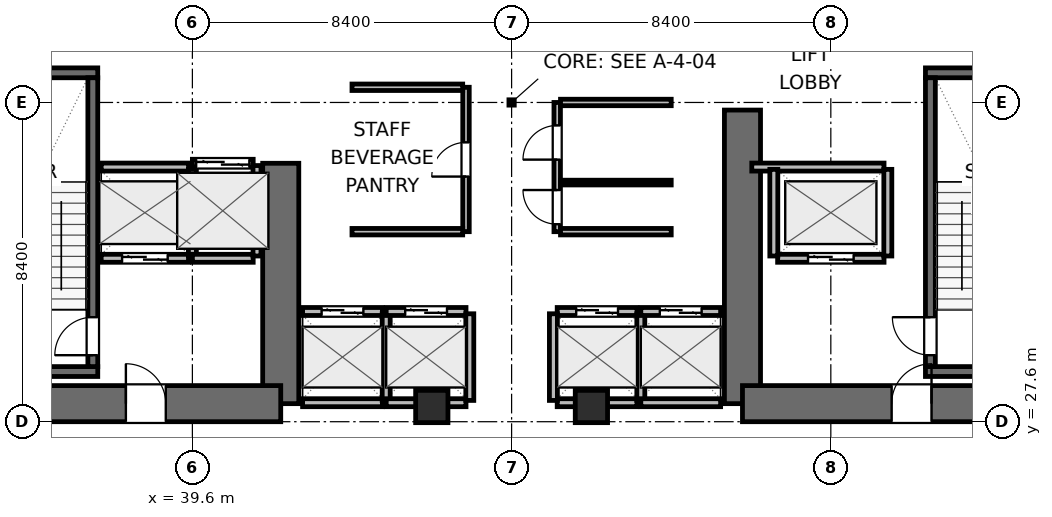
"""IFC4 building model, lengths in metres.
Left out: names, types, materials, properties, quantities, classifications, styles, units other than length and angle.
Written with IfcOpenShell. Run it as: python <this file> out.ifc"""

import sys

from ifc_helpers import new_model, si_unit, direction, frame, frame_2d, origin, origin_2d, place, context, subcontext, project, spatial, rectangle, extrude, element, fill, save


model = new_model("IFC4")
c1 = context("Model", 3, precision=1e-05, world=origin(), true_north=direction((0.0, 1.0)))
c2 = subcontext(c1, "Body", "Model", "MODEL_VIEW")
j1 = project(units=[si_unit("LENGTHUNIT", "METRE"), si_unit("PLANEANGLEUNIT", "RADIAN")], contexts=[c1])
p1 = place(None, origin())
s1 = spatial("IfcSite", under=j1, at=p1, CompositionType="ELEMENT")
p2 = place(p1, origin())
s2 = spatial("IfcBuilding", under=s1, at=p2, CompositionType="ELEMENT")
p3 = place(p2, frame((0.0, 0.0, 68.4)))
s3 = spatial("IfcBuildingStorey", under=s2, at=p3, CompositionType="ELEMENT", Elevation=68.4)
p4 = place(p3, frame((41.925, 28.075, 0.0), z_axis=(0.0, 0.0, 1.0), x_axis=(0.0, 1.0, 0.0)))
e1 = element("IfcWall", 1, at=p4, inside=s3, PredefinedType="SHEAR", context=c2, shape_type="SweptSolid", body=[
    extrude(rectangle(XDim=6.325, YDim=0.95, at=frame_2d((3.163, 0.0))), origin(), (0.0, 0.0, 1.0), 4.5),
])
p5 = place(p3, frame((32.875, 28.075, 0.0), z_axis=(0.0, 0.0, 1.0), x_axis=(1.0, 0.0, 0.0)))
e2 = element("IfcWall", 2, at=p5, inside=s3, PredefinedType="SHEAR", context=c2, shape_type="SweptSolid", body=[
    extrude(rectangle(XDim=9.05, YDim=0.95, at=frame_2d((4.525, 0.0))), origin(), (0.0, 0.0, 1.0), 4.5),
])
p6 = place(p5, frame((4.975, 0.0, 0.0)))
e3 = element("IfcOpeningElement", 3, at=p6, cuts=e2, PredefinedType="OPENING", context=c2, shape_type="SweptSolid", body=[
    extrude(rectangle(XDim=1.05, YDim=2.04, at=frame_2d((0.525, 1.02))), frame((0.0, 0.485, 0.0), z_axis=(0.0, -1.0, 0.0), x_axis=(1.0, 0.0, 0.0)), (0.0, 0.0, 1.0), 0.97),
])
p7 = place(p3, frame((54.075, 28.075, 0.0), z_axis=(0.0, 0.0, 1.0), x_axis=(0.0, 1.0, 0.0)))
e4 = element("IfcWall", 4, at=p7, inside=s3, PredefinedType="SHEAR", context=c2, shape_type="SweptSolid", body=[
    extrude(rectangle(XDim=7.725, YDim=0.95, at=frame_2d((3.863, 0.0))), origin(), (0.0, 0.0, 1.0), 4.5),
])
p8 = place(p3, frame((54.075, 28.075, 0.0), z_axis=(0.0, 0.0, 1.0), x_axis=(1.0, 0.0, 0.0)))
e5 = element("IfcWall", 5, at=p8, inside=s3, PredefinedType="SHEAR", context=c2, shape_type="SweptSolid", body=[
    extrude(rectangle(XDim=9.05, YDim=0.95, at=frame_2d((4.525, 0.0))), origin(), (0.0, 0.0, 1.0), 4.5),
])
p9 = place(p8, frame((3.925, 0.0, 0.0)))
e6 = element("IfcOpeningElement", 6, at=p9, cuts=e5, PredefinedType="OPENING", context=c2, shape_type="SweptSolid", body=[
    extrude(rectangle(XDim=1.05, YDim=2.04, at=frame_2d((0.525, 1.02))), frame((0.0, 0.485, 0.0), z_axis=(0.0, -1.0, 0.0), x_axis=(1.0, 0.0, 0.0)), (0.0, 0.0, 1.0), 0.97),
])
for number, where, z_axis, x_axis in (
    (7, (33.35, 28.92, 0.0), (0.0, 0.0, 1.0), (1.0, 0.0, 0.0)),
    (8, (33.35, 36.78, 0.0), (0.0, 0.0, 1.0), (1.0, 0.0, 0.0)),
):
    element("IfcWall", number, at=place(p3, frame(where, z_axis=z_axis, x_axis=x_axis)), inside=s3, PredefinedType="SHEAR", context=c2, shape_type="SweptSolid", body=[
        extrude(rectangle(XDim=3.76, YDim=0.26, at=frame_2d((1.88, 0.0))), origin(), (0.0, 0.0, 1.0), 4.5),
    ])
p10 = place(p3, frame((36.98, 29.05, 0.0), z_axis=(0.0, 0.0, 1.0), x_axis=(0.0, 1.0, 0.0)))
e9 = element("IfcWall", 9, at=p10, inside=s3, PredefinedType="SHEAR", context=c2, shape_type="SweptSolid", body=[
    extrude(rectangle(XDim=7.6, YDim=0.26, at=frame_2d((3.8, 0.0))), origin(), (0.0, 0.0, 1.0), 4.5),
])
p11 = place(p10, frame((0.3, 0.0, 0.0)))
e10 = element("IfcOpeningElement", 10, at=p11, cuts=e9, PredefinedType="OPENING", context=c2, shape_type="SweptSolid", body=[
    extrude(rectangle(XDim=1.0, YDim=2.04, at=frame_2d((0.5, 1.02))), frame((0.0, 0.14, 0.0), z_axis=(0.0, -1.0, 0.0), x_axis=(1.0, 0.0, 0.0)), (0.0, 0.0, 1.0), 0.28),
])
for number, where, z_axis, x_axis in (
    (11, (58.89, 28.92, 0.0), (0.0, 0.0, 1.0), (1.0, 0.0, 0.0)),
    (12, (58.89, 36.78, 0.0), (0.0, 0.0, 1.0), (1.0, 0.0, 0.0)),
):
    element("IfcWall", number, at=place(p3, frame(where, z_axis=z_axis, x_axis=x_axis)), inside=s3, PredefinedType="SHEAR", context=c2, shape_type="SweptSolid", body=[
        extrude(rectangle(XDim=3.76, YDim=0.26, at=frame_2d((1.88, 0.0))), origin(), (0.0, 0.0, 1.0), 4.5),
    ])
p12 = place(p3, frame((59.02, 29.05, 0.0), z_axis=(0.0, 0.0, 1.0), x_axis=(0.0, 1.0, 0.0)))
e13 = element("IfcWall", 13, at=p12, inside=s3, PredefinedType="SHEAR", context=c2, shape_type="SweptSolid", body=[
    extrude(rectangle(XDim=7.6, YDim=0.26, at=frame_2d((3.8, 0.0))), origin(), (0.0, 0.0, 1.0), 4.5),
])
p13 = place(p12, frame((0.3, 0.0, 0.0)))
e14 = element("IfcOpeningElement", 14, at=p13, cuts=e13, PredefinedType="OPENING", context=c2, shape_type="SweptSolid", body=[
    extrude(rectangle(XDim=1.0, YDim=2.04, at=frame_2d((0.5, 1.02))), frame((0.0, 0.14, 0.0), z_axis=(0.0, -1.0, 0.0), x_axis=(1.0, 0.0, 0.0)), (0.0, 0.0, 1.0), 0.28),
])
for number, where, z_axis, x_axis in (
    (15, (45.9, 28.0, 0.0), (0.0, 0.0, 1.0), (1.0, 0.0, 0.0)),
    (16, (50.1, 28.0, 0.0), (0.0, 0.0, 1.0), (1.0, 0.0, 0.0)),
):
    element("IfcColumn", number, at=place(p3, frame(where, z_axis=z_axis, x_axis=x_axis)), inside=s3, PredefinedType="COLUMN", context=c2, shape_type="SweptSolid", body=[
        extrude(rectangle(XDim=0.85, YDim=0.85, at=origin_2d()), origin(), (0.0, 0.0, 1.0), 4.5),
    ])
p14 = place(p3, frame((37.2, 31.9, 0.0), z_axis=(0.0, 0.0, 1.0), x_axis=(1.0, 0.0, 0.0)))
e17 = element("IfcWall", 17, at=p14, inside=s3, PredefinedType="PARTITIONING", context=c2, shape_type="SweptSolid", body=[
    extrude(rectangle(XDim=2.3, YDim=0.21, at=frame_2d((1.15, 0.0))), origin(), (0.0, 0.0, 1.0), 4.24),
])
p15 = place(p14, frame((0.55, 0.0, 0.0)))
e18 = element("IfcOpeningElement", 18, at=p15, cuts=e17, PredefinedType="OPENING", context=c2, shape_type="SweptSolid", body=[
    extrude(rectangle(XDim=1.2, YDim=2.04, at=frame_2d((0.6, 1.02))), frame((0.0, 0.115, 0.0), z_axis=(0.0, -1.0, 0.0), x_axis=(1.0, 0.0, 0.0)), (0.0, 0.0, 1.0), 0.23),
])
p16 = place(p3, frame((37.2, 34.3, 0.0), z_axis=(0.0, 0.0, 1.0), x_axis=(1.0, 0.0, 0.0)))
e19 = element("IfcWall", 19, at=p16, inside=s3, PredefinedType="PARTITIONING", context=c2, shape_type="SweptSolid", body=[
    extrude(rectangle(XDim=2.3, YDim=0.21, at=frame_2d((1.15, 0.0))), origin(), (0.0, 0.0, 1.0), 4.24),
])
p17 = place(p3, frame((39.6, 31.96, 0.0), z_axis=(0.0, 0.0, 1.0), x_axis=(0.0, 1.0, 0.0)))
e20 = element("IfcWall", 20, at=p17, inside=s3, PredefinedType="PARTITIONING", context=c2, shape_type="SweptSolid", body=[
    extrude(rectangle(XDim=2.28, YDim=0.21, at=frame_2d((1.14, 0.0))), origin(), (0.0, 0.0, 1.0), 4.24),
])
p18 = place(p3, frame((55.0, 31.9, 0.0), z_axis=(0.0, 0.0, 1.0), x_axis=(1.0, 0.0, 0.0)))
e21 = element("IfcWall", 21, at=p18, inside=s3, PredefinedType="PARTITIONING", context=c2, shape_type="SweptSolid", body=[
    extrude(rectangle(XDim=2.8, YDim=0.21, at=frame_2d((1.4, 0.0))), origin(), (0.0, 0.0, 1.0), 4.24),
])
p19 = place(p18, frame((0.8, 0.0, 0.0)))
e22 = element("IfcOpeningElement", 22, at=p19, cuts=e21, PredefinedType="OPENING", context=c2, shape_type="SweptSolid", body=[
    extrude(rectangle(XDim=1.2, YDim=2.04, at=frame_2d((0.6, 1.02))), frame((0.0, 0.115, 0.0), z_axis=(0.0, -1.0, 0.0), x_axis=(1.0, 0.0, 0.0)), (0.0, 0.0, 1.0), 0.23),
])
p20 = place(p3, frame((54.32, 34.3, 0.0), z_axis=(0.0, 0.0, 1.0), x_axis=(1.0, 0.0, 0.0)))
e23 = element("IfcWall", 23, at=p20, inside=s3, PredefinedType="PARTITIONING", context=c2, shape_type="SweptSolid", body=[
    extrude(rectangle(XDim=3.48, YDim=0.21, at=frame_2d((1.74, 0.0))), origin(), (0.0, 0.0, 1.0), 4.24),
])
for number, where, z_axis, x_axis in (
    (24, (54.9, 31.96, 0.0), (0.0, 0.0, 1.0), (0.0, 1.0, 0.0)),
    (25, (57.9, 31.96, 0.0), (0.0, 0.0, 1.0), (0.0, 1.0, 0.0)),
):
    element("IfcWall", number, at=place(p3, frame(where, z_axis=z_axis, x_axis=x_axis)), inside=s3, PredefinedType="PARTITIONING", context=c2, shape_type="SweptSolid", body=[
        extrude(rectangle(XDim=2.28, YDim=0.21, at=frame_2d((1.14, 0.0))), origin(), (0.0, 0.0, 1.0), 4.24),
    ])
p21 = place(p3, frame((39.6, 34.4, 0.0), z_axis=(0.0, 0.0, 1.0), x_axis=(1.0, 0.0, 0.0)))
e26 = element("IfcWall", 26, at=p21, inside=s3, PredefinedType="PARTITIONING", context=c2, shape_type="SweptSolid", body=[
    extrude(rectangle(XDim=1.6, YDim=0.21, at=frame_2d((0.8, 0.0))), origin(), (0.0, 0.0, 1.0), 4.24),
])
p22 = place(p21, frame((0.1, 0.0, 0.0)))
e27 = element("IfcOpeningElement", 27, at=p22, cuts=e26, PredefinedType="OPENING", context=c2, shape_type="SweptSolid", body=[
    extrude(rectangle(XDim=1.4, YDim=2.06, at=frame_2d((0.7, 1.03))), frame((0.0, 0.115, 0.0), z_axis=(0.0, -1.0, 0.0), x_axis=(1.0, 0.0, 0.0)), (0.0, 0.0, 1.0), 0.23),
])
p23 = place(p3, frame((39.6, 31.9, 0.0), z_axis=(0.0, 0.0, 1.0), x_axis=(1.0, 0.0, 0.0)))
e28 = element("IfcWall", 28, at=p23, inside=s3, PredefinedType="PARTITIONING", context=c2, shape_type="SweptSolid", body=[
    extrude(rectangle(XDim=1.6, YDim=0.21, at=frame_2d((0.8, 0.0))), origin(), (0.0, 0.0, 1.0), 4.24),
])
p24 = place(p3, frame((41.3, 31.96, 0.0), z_axis=(0.0, 0.0, 1.0), x_axis=(0.0, 1.0, 0.0)))
e29 = element("IfcWall", 29, at=p24, inside=s3, PredefinedType="PARTITIONING", context=c2, shape_type="SweptSolid", body=[
    extrude(rectangle(XDim=2.38, YDim=0.21, at=frame_2d((1.19, 0.0))), origin(), (0.0, 0.0, 1.0), 4.24),
])
p25 = place(p3, frame((42.5, 30.5, 0.0), z_axis=(0.0, 0.0, 1.0), x_axis=(1.0, 0.0, 0.0)))
e30 = element("IfcWall", 30, at=p25, inside=s3, PredefinedType="PARTITIONING", context=c2, shape_type="SweptSolid", body=[
    extrude(rectangle(XDim=2.1, YDim=0.21, at=frame_2d((1.05, 0.0))), origin(), (0.0, 0.0, 1.0), 4.24),
])
p26 = place(p25, frame((0.5, 0.0, 0.0)))
e31 = element("IfcOpeningElement", 31, at=p26, cuts=e30, PredefinedType="OPENING", context=c2, shape_type="SweptSolid", body=[
    extrude(rectangle(XDim=1.1, YDim=2.04, at=frame_2d((0.55, 1.02))), frame((0.0, 0.115, 0.0), z_axis=(0.0, -1.0, 0.0), x_axis=(1.0, 0.0, 0.0)), (0.0, 0.0, 1.0), 0.23),
])
p27 = place(p3, frame((42.5, 28.1, 0.0), z_axis=(0.0, 0.0, 1.0), x_axis=(1.0, 0.0, 0.0)))
e32 = element("IfcWall", 32, at=p27, inside=s3, PredefinedType="PARTITIONING", context=c2, shape_type="SweptSolid", body=[
    extrude(rectangle(XDim=2.1, YDim=0.21, at=frame_2d((1.05, 0.0))), origin(), (0.0, 0.0, 1.0), 3.125),
])
p28 = place(p3, frame((44.7, 28.16, 0.0), z_axis=(0.0, 0.0, 1.0), x_axis=(0.0, 1.0, 0.0)))
e33 = element("IfcWall", 33, at=p28, inside=s3, PredefinedType="PARTITIONING", context=c2, shape_type="SweptSolid", body=[
    extrude(rectangle(XDim=2.28, YDim=0.21, at=frame_2d((1.14, 0.0))), origin(), (0.0, 0.0, 1.0), 4.24),
])
p29 = place(p3, frame((44.7, 30.5, 0.0), z_axis=(0.0, 0.0, 1.0), x_axis=(1.0, 0.0, 0.0)))
e34 = element("IfcWall", 34, at=p29, inside=s3, PredefinedType="PARTITIONING", context=c2, shape_type="SweptSolid", body=[
    extrude(rectangle(XDim=2.1, YDim=0.21, at=frame_2d((1.05, 0.0))), origin(), (0.0, 0.0, 1.0), 4.24),
])
p30 = place(p29, frame((0.5, 0.0, 0.0)))
e35 = element("IfcOpeningElement", 35, at=p30, cuts=e34, PredefinedType="OPENING", context=c2, shape_type="SweptSolid", body=[
    extrude(rectangle(XDim=1.1, YDim=2.04, at=frame_2d((0.55, 1.02))), frame((0.0, 0.115, 0.0), z_axis=(0.0, -1.0, 0.0), x_axis=(1.0, 0.0, 0.0)), (0.0, 0.0, 1.0), 0.23),
])
p31 = place(p3, frame((44.7, 28.1, 0.0), z_axis=(0.0, 0.0, 1.0), x_axis=(1.0, 0.0, 0.0)))
e36 = element("IfcWall", 36, at=p31, inside=s3, PredefinedType="PARTITIONING", context=c2, shape_type="SweptSolid", body=[
    extrude(rectangle(XDim=2.1, YDim=0.21, at=frame_2d((1.05, 0.0))), origin(), (0.0, 0.0, 1.0), 3.125),
])
p32 = place(p3, frame((46.9, 28.16, 0.0), z_axis=(0.0, 0.0, 1.0), x_axis=(0.0, 1.0, 0.0)))
e37 = element("IfcWall", 37, at=p32, inside=s3, PredefinedType="PARTITIONING", context=c2, shape_type="SweptSolid", body=[
    extrude(rectangle(XDim=2.28, YDim=0.21, at=frame_2d((1.14, 0.0))), origin(), (0.0, 0.0, 1.0), 4.24),
])
p33 = place(p3, frame((49.2, 30.5, 0.0), z_axis=(0.0, 0.0, 1.0), x_axis=(1.0, 0.0, 0.0)))
e38 = element("IfcWall", 38, at=p33, inside=s3, PredefinedType="PARTITIONING", context=c2, shape_type="SweptSolid", body=[
    extrude(rectangle(XDim=2.1, YDim=0.21, at=frame_2d((1.05, 0.0))), origin(), (0.0, 0.0, 1.0), 4.24),
])
p34 = place(p33, frame((0.5, 0.0, 0.0)))
e39 = element("IfcOpeningElement", 39, at=p34, cuts=e38, PredefinedType="OPENING", context=c2, shape_type="SweptSolid", body=[
    extrude(rectangle(XDim=1.1, YDim=2.04, at=frame_2d((0.55, 1.02))), frame((0.0, 0.115, 0.0), z_axis=(0.0, -1.0, 0.0), x_axis=(1.0, 0.0, 0.0)), (0.0, 0.0, 1.0), 0.23),
])
p35 = place(p3, frame((49.2, 28.1, 0.0), z_axis=(0.0, 0.0, 1.0), x_axis=(1.0, 0.0, 0.0)))
e40 = element("IfcWall", 40, at=p35, inside=s3, PredefinedType="PARTITIONING", context=c2, shape_type="SweptSolid", body=[
    extrude(rectangle(XDim=2.1, YDim=0.21, at=frame_2d((1.05, 0.0))), origin(), (0.0, 0.0, 1.0), 3.125),
])
for number, where, z_axis, x_axis in (
    (41, (49.1, 28.16, 0.0), (0.0, 0.0, 1.0), (0.0, 1.0, 0.0)),
    (42, (51.4, 28.16, 0.0), (0.0, 0.0, 1.0), (0.0, 1.0, 0.0)),
):
    element("IfcWall", number, at=place(p3, frame(where, z_axis=z_axis, x_axis=x_axis)), inside=s3, PredefinedType="PARTITIONING", context=c2, shape_type="SweptSolid", body=[
        extrude(rectangle(XDim=2.28, YDim=0.21, at=frame_2d((1.14, 0.0))), origin(), (0.0, 0.0, 1.0), 4.24),
    ])
p36 = place(p3, frame((51.4, 30.5, 0.0), z_axis=(0.0, 0.0, 1.0), x_axis=(1.0, 0.0, 0.0)))
e43 = element("IfcWall", 43, at=p36, inside=s3, PredefinedType="PARTITIONING", context=c2, shape_type="SweptSolid", body=[
    extrude(rectangle(XDim=2.1, YDim=0.21, at=frame_2d((1.05, 0.0))), origin(), (0.0, 0.0, 1.0), 4.24),
])
p37 = place(p36, frame((0.5, 0.0, 0.0)))
e44 = element("IfcOpeningElement", 44, at=p37, cuts=e43, PredefinedType="OPENING", context=c2, shape_type="SweptSolid", body=[
    extrude(rectangle(XDim=1.1, YDim=2.04, at=frame_2d((0.55, 1.02))), frame((0.0, 0.115, 0.0), z_axis=(0.0, -1.0, 0.0), x_axis=(1.0, 0.0, 0.0)), (0.0, 0.0, 1.0), 0.23),
])
p38 = place(p3, frame((51.4, 28.1, 0.0), z_axis=(0.0, 0.0, 1.0), x_axis=(1.0, 0.0, 0.0)))
e45 = element("IfcWall", 45, at=p38, inside=s3, PredefinedType="PARTITIONING", context=c2, shape_type="SweptSolid", body=[
    extrude(rectangle(XDim=2.1, YDim=0.21, at=frame_2d((1.05, 0.0))), origin(), (0.0, 0.0, 1.0), 3.125),
])
p39 = place(p3, frame((46.8, 32.6, 0.0), z_axis=(0.0, 0.0, 1.0), x_axis=(0.0, 1.0, 0.0)))
e46 = element("IfcWall", 46, at=p39, inside=s3, PredefinedType="PARTITIONING", context=c2, shape_type="SweptSolid", body=[
    extrude(rectangle(XDim=3.8, YDim=0.17, at=frame_2d((1.9, 0.0))), origin(), (0.0, 0.0, 1.0), 4.24),
])
p40 = place(p39, frame((1.45, 0.0, 0.0)))
e47 = element("IfcOpeningElement", 47, at=p40, cuts=e46, PredefinedType="OPENING", context=c2, shape_type="SweptSolid", body=[
    extrude(rectangle(XDim=0.9, YDim=2.02, at=frame_2d((0.45, 1.01))), frame((0.0, 0.095, 0.0), z_axis=(0.0, -1.0, 0.0), x_axis=(1.0, 0.0, 0.0)), (0.0, 0.0, 1.0), 0.19),
])
for number, where, z_axis, x_axis in (
    (48, (43.8, 32.6, 0.0), (0.0, 0.0, 1.0), (1.0, 0.0, 0.0)),
    (49, (43.8, 36.4, 0.0), (0.0, 0.0, 1.0), (1.0, 0.0, 0.0)),
):
    element("IfcWall", number, at=place(p3, frame(where, z_axis=z_axis, x_axis=x_axis)), inside=s3, PredefinedType="PARTITIONING", context=c2, shape_type="SweptSolid", body=[
        extrude(rectangle(XDim=2.913, YDim=0.17, at=frame_2d((1.457, 0.0))), origin(), (0.0, 0.0, 1.0), 4.24),
    ])
p41 = place(p3, frame((49.2, 32.6, 0.0), z_axis=(0.0, 0.0, 1.0), x_axis=(0.0, 1.0, 0.0)))
e50 = element("IfcWall", 50, at=p41, inside=s3, PredefinedType="PARTITIONING", context=c2, shape_type="SweptSolid", body=[
    extrude(rectangle(XDim=3.4, YDim=0.17, at=frame_2d((1.7, 0.0))), origin(), (0.0, 0.0, 1.0), 4.24),
])
p42 = place(p41, frame((0.196, 0.0, 0.0)))
e51 = element("IfcOpeningElement", 51, at=p42, cuts=e50, PredefinedType="OPENING", context=c2, shape_type="SweptSolid", body=[
    extrude(rectangle(XDim=0.9, YDim=2.02, at=frame_2d((0.45, 1.01))), frame((0.0, 0.095, 0.0), z_axis=(0.0, -1.0, 0.0), x_axis=(1.0, 0.0, 0.0)), (0.0, 0.0, 1.0), 0.19),
])
p43 = place(p41, frame((1.896, 0.0, 0.0)))
e52 = element("IfcOpeningElement", 52, at=p43, cuts=e50, PredefinedType="OPENING", context=c2, shape_type="SweptSolid", body=[
    extrude(rectangle(XDim=0.9, YDim=2.02, at=frame_2d((0.45, 1.01))), frame((0.0, 0.095, 0.0), z_axis=(0.0, -1.0, 0.0), x_axis=(1.0, 0.0, 0.0)), (0.0, 0.0, 1.0), 0.19),
])
for number, where, z_axis, x_axis in (
    (53, (49.287, 32.6, 0.0), (0.0, 0.0, 1.0), (1.0, 0.0, 0.0)),
    (54, (49.287, 36.0, 0.0), (0.0, 0.0, 1.0), (1.0, 0.0, 0.0)),
):
    element("IfcWall", number, at=place(p3, frame(where, z_axis=z_axis, x_axis=x_axis)), inside=s3, PredefinedType="PARTITIONING", context=c2, shape_type="SweptSolid", body=[
        extrude(rectangle(XDim=2.913, YDim=0.17, at=frame_2d((1.457, 0.0))), origin(), (0.0, 0.0, 1.0), 4.24),
    ])
p44 = place(p3, frame((49.287, 33.892, 0.0), z_axis=(0.0, 0.0, 1.0), x_axis=(1.0, 0.0, 0.0)))
e55 = element("IfcWall", 55, at=p44, inside=s3, PredefinedType="PARTITIONING", context=c2, shape_type="SweptSolid", body=[
    extrude(rectangle(XDim=2.913, YDim=0.125, at=frame_2d((1.457, 0.0))), origin(), (0.0, 0.0, 1.0), 4.24),
])
p45 = place(p11, origin())
e56 = element("IfcDoor", 56, at=p45, inside=s3, OperationType="SINGLE_SWING_LEFT", PredefinedType="DOOR", context=c2, shape_type="SweptSolid", body=[
    extrude(rectangle(XDim=1.0, YDim=2.04, at=frame_2d((0.5, 1.02))), frame((0.0, 0.025, 0.0), z_axis=(0.0, -1.0, 0.0), x_axis=(1.0, 0.0, 0.0)), (0.0, 0.0, 1.0), 0.05),
])
fill(e10, e56)
p46 = place(p13, origin())
e57 = element("IfcDoor", 57, at=p46, inside=s3, OperationType="SINGLE_SWING_RIGHT", PredefinedType="DOOR", context=c2, shape_type="SweptSolid", body=[
    extrude(rectangle(XDim=1.0, YDim=2.04, at=frame_2d((0.5, 1.02))), frame((0.0, 0.025, 0.0), z_axis=(0.0, -1.0, 0.0), x_axis=(1.0, 0.0, 0.0)), (0.0, 0.0, 1.0), 0.05),
])
fill(e14, e57)
p47 = place(p15, origin())
e58 = element("IfcDoor", 58, at=p47, inside=s3, OperationType="DOUBLE_DOOR_SLIDING", PredefinedType="DOOR", context=c2, shape_type="SweptSolid", body=[
    extrude(rectangle(XDim=1.2, YDim=2.04, at=frame_2d((0.6, 1.02))), frame((0.0, 0.025, 0.0), z_axis=(0.0, -1.0, 0.0), x_axis=(1.0, 0.0, 0.0)), (0.0, 0.0, 1.0), 0.05),
])
fill(e18, e58)
p48 = place(p19, origin())
e59 = element("IfcDoor", 59, at=p48, inside=s3, OperationType="DOUBLE_DOOR_SLIDING", PredefinedType="DOOR", context=c2, shape_type="SweptSolid", body=[
    extrude(rectangle(XDim=1.2, YDim=2.04, at=frame_2d((0.6, 1.02))), frame((0.0, 0.025, 0.0), z_axis=(0.0, -1.0, 0.0), x_axis=(1.0, 0.0, 0.0)), (0.0, 0.0, 1.0), 0.05),
])
fill(e22, e59)
p49 = place(p22, origin())
e60 = element("IfcDoor", 60, at=p49, inside=s3, OperationType="DOUBLE_DOOR_SLIDING", PredefinedType="DOOR", context=c2, shape_type="SweptSolid", body=[
    extrude(rectangle(XDim=1.4, YDim=2.06, at=frame_2d((0.7, 1.03))), frame((0.0, 0.025, 0.0), z_axis=(0.0, -1.0, 0.0), x_axis=(1.0, 0.0, 0.0)), (0.0, 0.0, 1.0), 0.05),
])
fill(e27, e60)
p50 = place(p26, origin())
e61 = element("IfcDoor", 61, at=p50, inside=s3, OperationType="DOUBLE_DOOR_SLIDING", PredefinedType="DOOR", context=c2, shape_type="SweptSolid", body=[
    extrude(rectangle(XDim=1.1, YDim=2.04, at=frame_2d((0.55, 1.02))), frame((0.0, 0.025, 0.0), z_axis=(0.0, -1.0, 0.0), x_axis=(1.0, 0.0, 0.0)), (0.0, 0.0, 1.0), 0.05),
])
fill(e31, e61)
p51 = place(p30, origin())
e62 = element("IfcDoor", 62, at=p51, inside=s3, OperationType="DOUBLE_DOOR_SLIDING", PredefinedType="DOOR", context=c2, shape_type="SweptSolid", body=[
    extrude(rectangle(XDim=1.1, YDim=2.04, at=frame_2d((0.55, 1.02))), frame((0.0, 0.025, 0.0), z_axis=(0.0, -1.0, 0.0), x_axis=(1.0, 0.0, 0.0)), (0.0, 0.0, 1.0), 0.05),
])
fill(e35, e62)
p52 = place(p34, origin())
e63 = element("IfcDoor", 63, at=p52, inside=s3, OperationType="DOUBLE_DOOR_SLIDING", PredefinedType="DOOR", context=c2, shape_type="SweptSolid", body=[
    extrude(rectangle(XDim=1.1, YDim=2.04, at=frame_2d((0.55, 1.02))), frame((0.0, 0.025, 0.0), z_axis=(0.0, -1.0, 0.0), x_axis=(1.0, 0.0, 0.0)), (0.0, 0.0, 1.0), 0.05),
])
fill(e39, e63)
p53 = place(p37, origin())
e64 = element("IfcDoor", 64, at=p53, inside=s3, OperationType="DOUBLE_DOOR_SLIDING", PredefinedType="DOOR", context=c2, shape_type="SweptSolid", body=[
    extrude(rectangle(XDim=1.1, YDim=2.04, at=frame_2d((0.55, 1.02))), frame((0.0, 0.025, 0.0), z_axis=(0.0, -1.0, 0.0), x_axis=(1.0, 0.0, 0.0)), (0.0, 0.0, 1.0), 0.05),
])
fill(e44, e64)
p54 = place(p6, origin())
e65 = element("IfcDoor", 65, at=p54, inside=s3, OperationType="SINGLE_SWING_LEFT", PredefinedType="DOOR", context=c2, shape_type="SweptSolid", body=[
    extrude(rectangle(XDim=1.05, YDim=2.04, at=frame_2d((0.525, 1.02))), frame((0.0, 0.025, 0.0), z_axis=(0.0, -1.0, 0.0), x_axis=(1.0, 0.0, 0.0)), (0.0, 0.0, 1.0), 0.05),
])
fill(e3, e65)
p55 = place(p9, origin())
e66 = element("IfcDoor", 66, at=p55, inside=s3, OperationType="SINGLE_SWING_RIGHT", PredefinedType="DOOR", context=c2, shape_type="SweptSolid", body=[
    extrude(rectangle(XDim=1.05, YDim=2.04, at=frame_2d((0.525, 1.02))), frame((0.0, 0.025, 0.0), z_axis=(0.0, -1.0, 0.0), x_axis=(1.0, 0.0, 0.0)), (0.0, 0.0, 1.0), 0.05),
])
fill(e6, e66)
p56 = place(p40, origin())
e67 = element("IfcDoor", 67, at=p56, inside=s3, OperationType="SINGLE_SWING_LEFT", PredefinedType="DOOR", context=c2, shape_type="SweptSolid", body=[
    extrude(rectangle(XDim=0.9, YDim=2.02, at=frame_2d((0.45, 1.01))), frame((0.0, 0.025, 0.0), z_axis=(0.0, -1.0, 0.0), x_axis=(1.0, 0.0, 0.0)), (0.0, 0.0, 1.0), 0.05),
])
fill(e47, e67)
p57 = place(p42, origin())
e68 = element("IfcDoor", 68, at=p57, inside=s3, OperationType="SINGLE_SWING_RIGHT", PredefinedType="DOOR", context=c2, shape_type="SweptSolid", body=[
    extrude(rectangle(XDim=0.9, YDim=2.02, at=frame_2d((0.45, 1.01))), frame((0.0, 0.025, 0.0), z_axis=(0.0, -1.0, 0.0), x_axis=(1.0, 0.0, 0.0)), (0.0, 0.0, 1.0), 0.05),
])
fill(e51, e68)
p58 = place(p43, origin())
e69 = element("IfcDoor", 69, at=p58, inside=s3, OperationType="SINGLE_SWING_LEFT", PredefinedType="DOOR", context=c2, shape_type="SweptSolid", body=[
    extrude(rectangle(XDim=0.9, YDim=2.02, at=frame_2d((0.45, 1.01))), frame((0.0, 0.025, 0.0), z_axis=(0.0, -1.0, 0.0), x_axis=(1.0, 0.0, 0.0)), (0.0, 0.0, 1.0), 0.05),
])
fill(e52, e69)
save(model, sys.argv[1])
